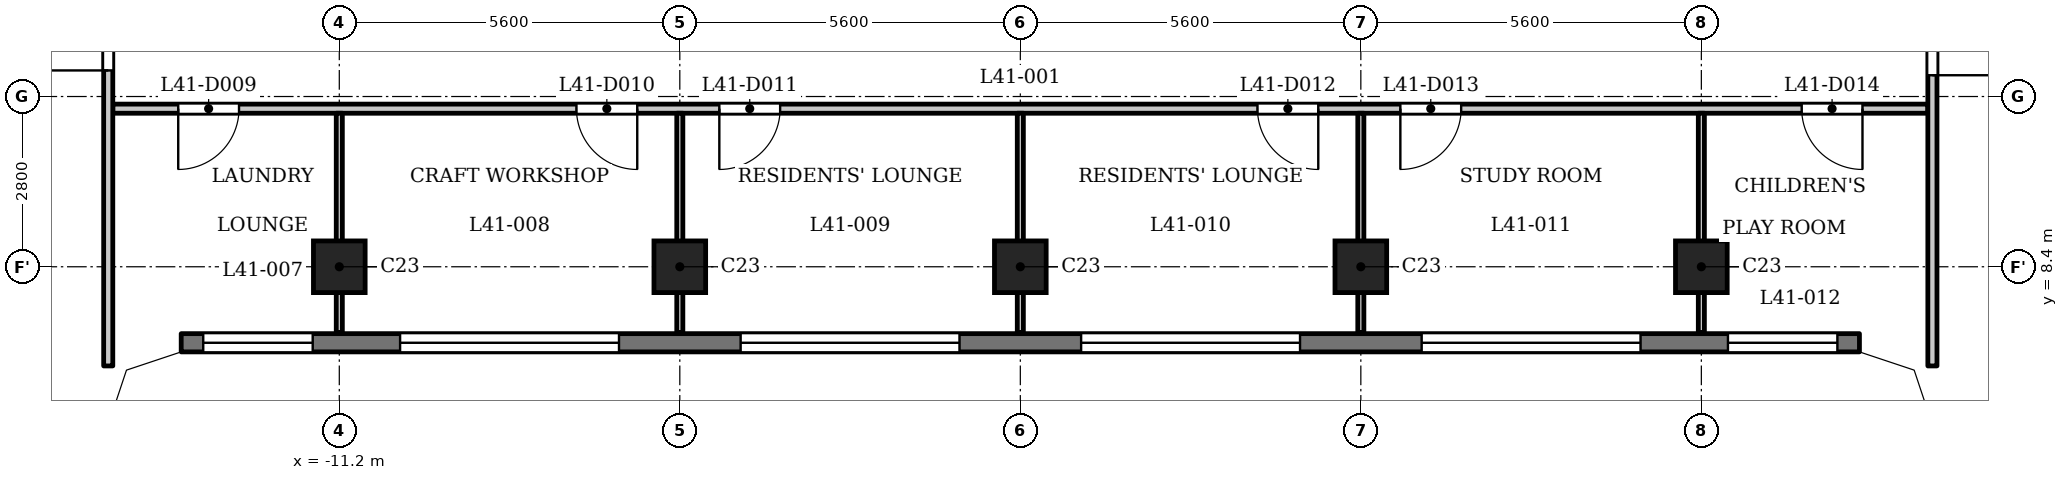
"""IFC4 building model, lengths in metres.
Left out: names, types, materials, properties, quantities, classifications, styles, units other than length and angle.
Written with IfcOpenShell. Run it as: python <this file> out.ifc"""

import sys

from ifc_helpers import new_model, si_unit, direction, frame, frame_2d, origin, origin_2d, place, context, subcontext, project, spatial, polyline, rectangle, outline, extrude, element, fill, save


model = new_model("IFC4")
c1 = context("Model", 3, precision=1e-05, world=origin(), true_north=direction((0.0, 1.0)))
c2 = subcontext(c1, "Body", "Model", "MODEL_VIEW")
j1 = project(units=[si_unit("LENGTHUNIT", "METRE"), si_unit("PLANEANGLEUNIT", "RADIAN")], contexts=[c1])
p1 = place(None, origin())
s1 = spatial("IfcSite", under=j1, at=p1, CompositionType="ELEMENT")
p2 = place(p1, origin())
s2 = spatial("IfcBuilding", under=s1, at=p2, CompositionType="ELEMENT")
p3 = place(p2, frame((0.0, 0.0, 160.6)))
s3 = spatial("IfcBuildingStorey", under=s2, at=p3, CompositionType="ELEMENT", Elevation=160.6)
for number, where, z_axis, x_axis in (
    (1, (-11.2, 8.4, 0.0), (0.0, 0.0, 1.0), (1.0, 0.0, 0.0)),
    (2, (-5.6, 8.4, 0.0), (0.0, 0.0, 1.0), (1.0, 0.0, 0.0)),
    (3, (0.0, 8.4, 0.0), (0.0, 0.0, 1.0), (1.0, 0.0, 0.0)),
    (4, (5.6, 8.4, 0.0), (0.0, 0.0, 1.0), (1.0, 0.0, 0.0)),
    (5, (11.2, 8.4, 0.0), (0.0, 0.0, 1.0), (1.0, 0.0, 0.0)),
):
    element("IfcColumn", number, at=place(p3, frame(where, z_axis=z_axis, x_axis=x_axis)), inside=s3, PredefinedType="COLUMN", context=c2, shape_type="SweptSolid", body=[
        extrude(rectangle(XDim=0.85, YDim=0.85, at=origin_2d()), origin(), (0.0, 0.0, 1.0), 3.5),
    ])
p4 = place(p3, frame((-13.8, 7.15, 0.0), z_axis=(0.0, 0.0, 1.0), x_axis=(1.0, 0.0, 0.0)))
e6 = element("IfcWall", 6, at=p4, inside=s3, PredefinedType="SOLIDWALL", context=c2, shape_type="SweptSolid", body=[
    extrude(rectangle(XDim=27.6, YDim=0.3, at=frame_2d((13.8, 0.0))), origin(), (0.0, 0.0, 1.0), 3.2),
])
p5 = place(p4, frame((0.363, 0.0, 0.9)))
e7 = element("IfcOpeningElement", 7, at=p5, cuts=e6, PredefinedType="OPENING", context=c2, shape_type="SweptSolid", body=[
    extrude(rectangle(XDim=1.8, YDim=1.25, at=frame_2d((0.9, 0.625))), frame((0.0, 0.16, 0.0), z_axis=(0.0, -1.0, 0.0), x_axis=(1.0, 0.0, 0.0)), (0.0, 0.0, 1.0), 0.32),
])
p6 = place(p4, frame((3.6, 0.0, 1.2)))
e8 = element("IfcOpeningElement", 8, at=p6, cuts=e6, PredefinedType="OPENING", context=c2, shape_type="SweptSolid", body=[
    extrude(rectangle(XDim=3.6, YDim=0.95, at=frame_2d((1.8, 0.475))), frame((0.0, 0.16, 0.0), z_axis=(0.0, -1.0, 0.0), x_axis=(1.0, 0.0, 0.0)), (0.0, 0.0, 1.0), 0.32),
])
p7 = place(p4, frame((9.2, 0.0, 1.2)))
e9 = element("IfcOpeningElement", 9, at=p7, cuts=e6, PredefinedType="OPENING", context=c2, shape_type="SweptSolid", body=[
    extrude(rectangle(XDim=3.6, YDim=0.95, at=frame_2d((1.8, 0.475))), frame((0.0, 0.16, 0.0), z_axis=(0.0, -1.0, 0.0), x_axis=(1.0, 0.0, 0.0)), (0.0, 0.0, 1.0), 0.32),
])
p8 = place(p4, frame((14.8, 0.0, 1.2)))
e10 = element("IfcOpeningElement", 10, at=p8, cuts=e6, PredefinedType="OPENING", context=c2, shape_type="SweptSolid", body=[
    extrude(rectangle(XDim=3.6, YDim=0.95, at=frame_2d((1.8, 0.475))), frame((0.0, 0.16, 0.0), z_axis=(0.0, -1.0, 0.0), x_axis=(1.0, 0.0, 0.0)), (0.0, 0.0, 1.0), 0.32),
])
p9 = place(p4, frame((20.4, 0.0, 1.2)))
e11 = element("IfcOpeningElement", 11, at=p9, cuts=e6, PredefinedType="OPENING", context=c2, shape_type="SweptSolid", body=[
    extrude(rectangle(XDim=3.6, YDim=0.95, at=frame_2d((1.8, 0.475))), frame((0.0, 0.16, 0.0), z_axis=(0.0, -1.0, 0.0), x_axis=(1.0, 0.0, 0.0)), (0.0, 0.0, 1.0), 0.32),
])
p10 = place(p4, frame((25.438, 0.0, 0.9)))
e12 = element("IfcOpeningElement", 12, at=p10, cuts=e6, PredefinedType="OPENING", context=c2, shape_type="SweptSolid", body=[
    extrude(rectangle(XDim=1.8, YDim=1.25, at=frame_2d((0.9, 0.625))), frame((0.0, 0.16, 0.0), z_axis=(0.0, -1.0, 0.0), x_axis=(1.0, 0.0, 0.0)), (0.0, 0.0, 1.0), 0.32),
])
p11 = place(p3, frame((-14.925, 11.0, 0.0), z_axis=(0.0, 0.0, 1.0), x_axis=(1.0, 0.0, 0.0)))
e13 = element("IfcWall", 13, at=p11, inside=s3, PredefinedType="PARTITIONING", context=c2, shape_type="SweptSolid", body=[
    extrude(rectangle(XDim=29.85, YDim=0.15, at=frame_2d((14.925, 0.0))), origin(), (0.0, 0.0, 1.0), 3.2),
])
p12 = place(p11, frame((1.076, 0.0, 0.0)))
e14 = element("IfcOpeningElement", 14, at=p12, cuts=e13, PredefinedType="OPENING", context=c2, shape_type="SweptSolid", body=[
    extrude(rectangle(XDim=1.0, YDim=2.1, at=frame_2d((0.5, 1.05))), frame((0.0, 0.085, 0.0), z_axis=(0.0, -1.0, 0.0), x_axis=(1.0, 0.0, 0.0)), (0.0, 0.0, 1.0), 0.17),
])
p13 = place(p11, frame((7.625, 0.0, 0.0)))
e15 = element("IfcOpeningElement", 15, at=p13, cuts=e13, PredefinedType="OPENING", context=c2, shape_type="SweptSolid", body=[
    extrude(rectangle(XDim=1.0, YDim=2.1, at=frame_2d((0.5, 1.05))), frame((0.0, 0.085, 0.0), z_axis=(0.0, -1.0, 0.0), x_axis=(1.0, 0.0, 0.0)), (0.0, 0.0, 1.0), 0.17),
])
p14 = place(p11, frame((9.975, 0.0, 0.0)))
e16 = element("IfcOpeningElement", 16, at=p14, cuts=e13, PredefinedType="OPENING", context=c2, shape_type="SweptSolid", body=[
    extrude(rectangle(XDim=1.0, YDim=2.1, at=frame_2d((0.5, 1.05))), frame((0.0, 0.085, 0.0), z_axis=(0.0, -1.0, 0.0), x_axis=(1.0, 0.0, 0.0)), (0.0, 0.0, 1.0), 0.17),
])
p15 = place(p11, frame((18.825, 0.0, 0.0)))
e17 = element("IfcOpeningElement", 17, at=p15, cuts=e13, PredefinedType="OPENING", context=c2, shape_type="SweptSolid", body=[
    extrude(rectangle(XDim=1.0, YDim=2.1, at=frame_2d((0.5, 1.05))), frame((0.0, 0.085, 0.0), z_axis=(0.0, -1.0, 0.0), x_axis=(1.0, 0.0, 0.0)), (0.0, 0.0, 1.0), 0.17),
])
p16 = place(p11, frame((21.175, 0.0, 0.0)))
e18 = element("IfcOpeningElement", 18, at=p16, cuts=e13, PredefinedType="OPENING", context=c2, shape_type="SweptSolid", body=[
    extrude(rectangle(XDim=1.0, YDim=2.1, at=frame_2d((0.5, 1.05))), frame((0.0, 0.085, 0.0), z_axis=(0.0, -1.0, 0.0), x_axis=(1.0, 0.0, 0.0)), (0.0, 0.0, 1.0), 0.17),
])
p17 = place(p11, frame((27.775, 0.0, 0.0)))
e19 = element("IfcOpeningElement", 19, at=p17, cuts=e13, PredefinedType="OPENING", context=c2, shape_type="SweptSolid", body=[
    extrude(rectangle(XDim=1.0, YDim=2.1, at=frame_2d((0.5, 1.05))), frame((0.0, 0.085, 0.0), z_axis=(0.0, -1.0, 0.0), x_axis=(1.0, 0.0, 0.0)), (0.0, 0.0, 1.0), 0.17),
])
p18 = place(p3, frame((-15.0, 6.769, 0.0), z_axis=(0.0, 0.0, 1.0), x_axis=(0.0, 1.0, 0.0)))
e20 = element("IfcWall", 20, at=p18, inside=s3, PredefinedType="PARTITIONING", context=c2, shape_type="SweptSolid", body=[
    extrude(rectangle(XDim=6.356, YDim=0.15, at=frame_2d((3.178, 0.0))), origin(), (0.0, 0.0, 1.0), 3.2),
])
p19 = place(p18, frame((4.86, 0.0, 0.0)))
e21 = element("IfcOpeningElement", 21, at=p19, cuts=e20, PredefinedType="OPENING", context=c2, shape_type="SweptSolid", body=[
    extrude(rectangle(XDim=1.0, YDim=2.1, at=frame_2d((0.5, 1.05))), frame((0.0, 0.085, 0.0), z_axis=(0.0, -1.0, 0.0), x_axis=(1.0, 0.0, 0.0)), (0.0, 0.0, 1.0), 0.17),
])
for number, where, z_axis, x_axis in (
    (22, (-11.2, 7.32, 0.0), (0.0, 0.0, 1.0), (0.0, 1.0, 0.0)),
    (23, (-5.6, 7.32, 0.0), (0.0, 0.0, 1.0), (0.0, 1.0, 0.0)),
    (24, (0.0, 7.32, 0.0), (0.0, 0.0, 1.0), (0.0, 1.0, 0.0)),
    (25, (5.6, 7.32, 0.0), (0.0, 0.0, 1.0), (0.0, 1.0, 0.0)),
    (26, (11.2, 7.32, 0.0), (0.0, 0.0, 1.0), (0.0, 1.0, 0.0)),
):
    element("IfcWall", number, at=place(p3, frame(where, z_axis=z_axis, x_axis=x_axis)), inside=s3, PredefinedType="PARTITIONING", context=c2, shape_type="SweptSolid", body=[
        extrude(rectangle(XDim=3.605, YDim=0.1, at=frame_2d((1.802, 0.0))), origin(), (0.0, 0.0, 1.0), 3.2),
    ])
p20 = place(p3, frame((15.0, 6.769, 0.0), z_axis=(0.0, 0.0, 1.0), x_axis=(0.0, 1.0, 0.0)))
e27 = element("IfcWall", 27, at=p20, inside=s3, PredefinedType="PARTITIONING", context=c2, shape_type="SweptSolid", body=[
    extrude(rectangle(XDim=6.356, YDim=0.15, at=frame_2d((3.178, 0.0))), origin(), (0.0, 0.0, 1.0), 3.2),
])
p21 = place(p20, frame((4.781, 0.0, 0.0)))
e28 = element("IfcOpeningElement", 28, at=p21, cuts=e27, PredefinedType="OPENING", context=c2, shape_type="SweptSolid", body=[
    extrude(rectangle(XDim=1.0, YDim=2.1, at=frame_2d((0.5, 1.05))), frame((0.0, 0.085, 0.0), z_axis=(0.0, -1.0, 0.0), x_axis=(1.0, 0.0, 0.0)), (0.0, 0.0, 1.0), 0.17),
])
p22 = place(p3, origin())
e29 = element("IfcWall", 29, at=p22, inside=s3, PredefinedType="SOLIDWALL", context=c2, shape_type="SweptSolid", body=[
    extrude(outline(polyline([(-13.849, 7.3), (-14.937, 6.937), (-15.3, 5.849), (-15.3, 5.8), (-15.0, 5.8), (-14.7, 6.7), (-13.8, 7.0), (-13.8, 7.3), (-13.849, 7.3)])), origin(), (0.0, 0.0, 1.0), 3.2),
])
e30 = element("IfcWall", 30, at=p22, inside=s3, PredefinedType="SOLIDWALL", context=c2, shape_type="SweptSolid", body=[
    extrude(outline(polyline([(14.937, 6.937), (13.849, 7.3), (13.8, 7.3), (13.8, 7.0), (14.7, 6.7), (15.0, 5.8), (15.3, 5.8), (15.3, 5.849), (14.937, 6.937)])), origin(), (0.0, 0.0, 1.0), 3.2),
])
p23 = place(p19, origin())
e31 = element("IfcDoor", 31, at=p23, inside=s3, OperationType="SINGLE_SWING_RIGHT", PredefinedType="DOOR", context=c2, shape_type="SweptSolid", body=[
    extrude(rectangle(XDim=1.0, YDim=2.1, at=frame_2d((0.5, 1.05))), frame((0.0, 0.025, 0.0), z_axis=(0.0, -1.0, 0.0), x_axis=(1.0, 0.0, 0.0)), (0.0, 0.0, 1.0), 0.05),
])
fill(e21, e31)
p24 = place(p21, origin())
e32 = element("IfcDoor", 32, at=p24, inside=s3, OperationType="SINGLE_SWING_LEFT", PredefinedType="DOOR", context=c2, shape_type="SweptSolid", body=[
    extrude(rectangle(XDim=1.0, YDim=2.1, at=frame_2d((0.5, 1.05))), frame((0.0, 0.025, 0.0), z_axis=(0.0, -1.0, 0.0), x_axis=(1.0, 0.0, 0.0)), (0.0, 0.0, 1.0), 0.05),
])
fill(e28, e32)
p25 = place(p12, origin())
e33 = element("IfcDoor", 33, at=p25, inside=s3, OperationType="SINGLE_SWING_LEFT", PredefinedType="DOOR", context=c2, shape_type="SweptSolid", body=[
    extrude(rectangle(XDim=1.0, YDim=2.1, at=frame_2d((0.5, 1.05))), frame((0.0, 0.025, 0.0), z_axis=(0.0, -1.0, 0.0), x_axis=(1.0, 0.0, 0.0)), (0.0, 0.0, 1.0), 0.05),
])
fill(e14, e33)
p26 = place(p13, origin())
e34 = element("IfcDoor", 34, at=p26, inside=s3, OperationType="SINGLE_SWING_RIGHT", PredefinedType="DOOR", context=c2, shape_type="SweptSolid", body=[
    extrude(rectangle(XDim=1.0, YDim=2.1, at=frame_2d((0.5, 1.05))), frame((0.0, 0.025, 0.0), z_axis=(0.0, -1.0, 0.0), x_axis=(1.0, 0.0, 0.0)), (0.0, 0.0, 1.0), 0.05),
])
fill(e15, e34)
p27 = place(p14, origin())
e35 = element("IfcDoor", 35, at=p27, inside=s3, OperationType="SINGLE_SWING_LEFT", PredefinedType="DOOR", context=c2, shape_type="SweptSolid", body=[
    extrude(rectangle(XDim=1.0, YDim=2.1, at=frame_2d((0.5, 1.05))), frame((0.0, 0.025, 0.0), z_axis=(0.0, -1.0, 0.0), x_axis=(1.0, 0.0, 0.0)), (0.0, 0.0, 1.0), 0.05),
])
fill(e16, e35)
p28 = place(p15, origin())
e36 = element("IfcDoor", 36, at=p28, inside=s3, OperationType="SINGLE_SWING_RIGHT", PredefinedType="DOOR", context=c2, shape_type="SweptSolid", body=[
    extrude(rectangle(XDim=1.0, YDim=2.1, at=frame_2d((0.5, 1.05))), frame((0.0, 0.025, 0.0), z_axis=(0.0, -1.0, 0.0), x_axis=(1.0, 0.0, 0.0)), (0.0, 0.0, 1.0), 0.05),
])
fill(e17, e36)
p29 = place(p16, origin())
e37 = element("IfcDoor", 37, at=p29, inside=s3, OperationType="SINGLE_SWING_LEFT", PredefinedType="DOOR", context=c2, shape_type="SweptSolid", body=[
    extrude(rectangle(XDim=1.0, YDim=2.1, at=frame_2d((0.5, 1.05))), frame((0.0, 0.025, 0.0), z_axis=(0.0, -1.0, 0.0), x_axis=(1.0, 0.0, 0.0)), (0.0, 0.0, 1.0), 0.05),
])
fill(e18, e37)
p30 = place(p17, origin())
e38 = element("IfcDoor", 38, at=p30, inside=s3, OperationType="SINGLE_SWING_RIGHT", PredefinedType="DOOR", context=c2, shape_type="SweptSolid", body=[
    extrude(rectangle(XDim=1.0, YDim=2.1, at=frame_2d((0.5, 1.05))), frame((0.0, 0.025, 0.0), z_axis=(0.0, -1.0, 0.0), x_axis=(1.0, 0.0, 0.0)), (0.0, 0.0, 1.0), 0.05),
])
fill(e19, e38)
p31 = place(p5, origin())
e39 = element("IfcWindow", 39, at=p31, inside=s3, PartitioningType="SINGLE_PANEL", PredefinedType="WINDOW", context=c2, shape_type="SweptSolid", body=[
    extrude(rectangle(XDim=1.8, YDim=1.25, at=frame_2d((0.9, 0.625))), frame((0.0, 0.03, 0.0), z_axis=(0.0, -1.0, 0.0), x_axis=(1.0, 0.0, 0.0)), (0.0, 0.0, 1.0), 0.06),
])
fill(e7, e39)
p32 = place(p6, origin())
e40 = element("IfcWindow", 40, at=p32, inside=s3, PartitioningType="SINGLE_PANEL", PredefinedType="WINDOW", context=c2, shape_type="SweptSolid", body=[
    extrude(rectangle(XDim=3.6, YDim=0.95, at=frame_2d((1.8, 0.475))), frame((0.0, 0.03, 0.0), z_axis=(0.0, -1.0, 0.0), x_axis=(1.0, 0.0, 0.0)), (0.0, 0.0, 1.0), 0.06),
])
fill(e8, e40)
p33 = place(p7, origin())
e41 = element("IfcWindow", 41, at=p33, inside=s3, PartitioningType="SINGLE_PANEL", PredefinedType="WINDOW", context=c2, shape_type="SweptSolid", body=[
    extrude(rectangle(XDim=3.6, YDim=0.95, at=frame_2d((1.8, 0.475))), frame((0.0, 0.03, 0.0), z_axis=(0.0, -1.0, 0.0), x_axis=(1.0, 0.0, 0.0)), (0.0, 0.0, 1.0), 0.06),
])
fill(e9, e41)
p34 = place(p8, origin())
e42 = element("IfcWindow", 42, at=p34, inside=s3, PartitioningType="SINGLE_PANEL", PredefinedType="WINDOW", context=c2, shape_type="SweptSolid", body=[
    extrude(rectangle(XDim=3.6, YDim=0.95, at=frame_2d((1.8, 0.475))), frame((0.0, 0.03, 0.0), z_axis=(0.0, -1.0, 0.0), x_axis=(1.0, 0.0, 0.0)), (0.0, 0.0, 1.0), 0.06),
])
fill(e10, e42)
p35 = place(p9, origin())
e43 = element("IfcWindow", 43, at=p35, inside=s3, PartitioningType="SINGLE_PANEL", PredefinedType="WINDOW", context=c2, shape_type="SweptSolid", body=[
    extrude(rectangle(XDim=3.6, YDim=0.95, at=frame_2d((1.8, 0.475))), frame((0.0, 0.03, 0.0), z_axis=(0.0, -1.0, 0.0), x_axis=(1.0, 0.0, 0.0)), (0.0, 0.0, 1.0), 0.06),
])
fill(e11, e43)
p36 = place(p10, origin())
e44 = element("IfcWindow", 44, at=p36, inside=s3, PartitioningType="SINGLE_PANEL", PredefinedType="WINDOW", context=c2, shape_type="SweptSolid", body=[
    extrude(rectangle(XDim=1.8, YDim=1.25, at=frame_2d((0.9, 0.625))), frame((0.0, 0.03, 0.0), z_axis=(0.0, -1.0, 0.0), x_axis=(1.0, 0.0, 0.0)), (0.0, 0.0, 1.0), 0.06),
])
fill(e12, e44)
save(model, sys.argv[1])
